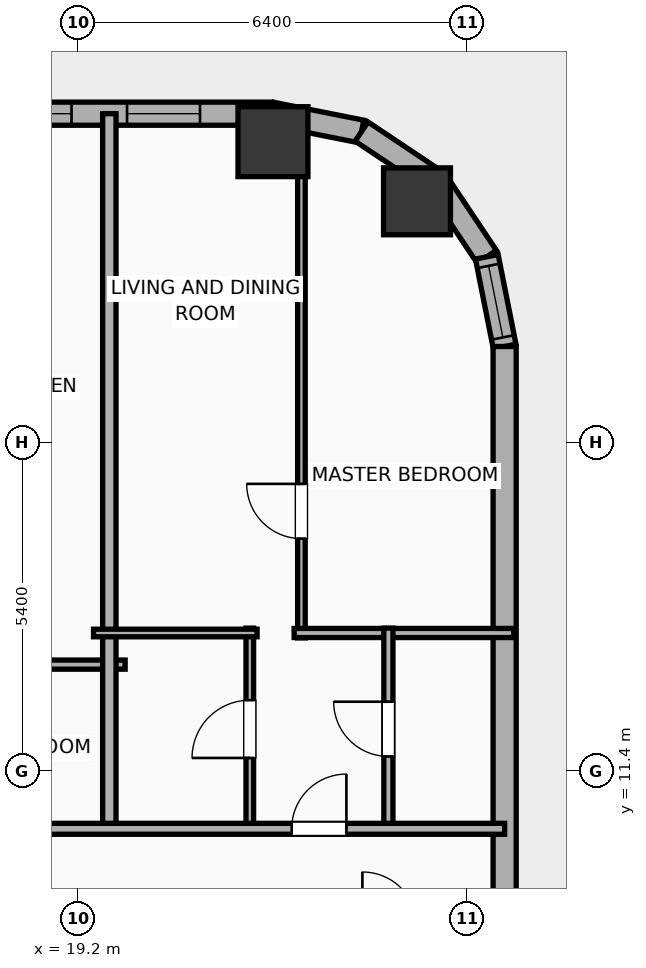
"""IFC4 building model, lengths in metres.
Left out: names, types, materials, properties, quantities, classifications, styles, units other than length and angle.
Written with IfcOpenShell. Run it as: python <this file> out.ifc"""

import sys

from ifc_helpers import new_model, si_unit, direction, frame, frame_2d, origin, origin_2d, place, context, subcontext, project, spatial, rectangle, hollow_rectangle, hollow_circle, extrude, element, fill, save


model = new_model("IFC4")
c1 = context("Model", 3, precision=1e-05, world=origin(), true_north=direction((0.0, 1.0)))
c2 = subcontext(c1, "Body", "Model", "MODEL_VIEW")
j1 = project(units=[si_unit("LENGTHUNIT", "METRE"), si_unit("PLANEANGLEUNIT", "RADIAN")], contexts=[c1])
p1 = place(None, origin())
s1 = spatial("IfcSite", under=j1, at=p1, CompositionType="ELEMENT")
p2 = place(p1, origin())
s2 = spatial("IfcBuilding", under=s1, at=p2, CompositionType="ELEMENT")
p3 = place(p2, frame((0.0, 0.0, 26.0)))
s3 = spatial("IfcBuildingStorey", under=s2, at=p3, CompositionType="ELEMENT", Elevation=26.0)
p4 = place(p3, frame((24.769, 20.769, -0.25), z_axis=(0.0, 0.0, 1.0), x_axis=(1.0, 0.0, 0.0)))
e1 = element("IfcColumn", 1, at=p4, inside=s3, PredefinedType="COLUMN", context=c2, shape_type="SweptSolid", body=[
    extrude(hollow_circle(Radius=0.55, WallThickness=0.036, at=origin_2d()), origin(), (0.0, 0.0, 1.0), 4.15),
])
p5 = place(p3, frame((22.4, 21.75, -0.25), z_axis=(0.0, 0.0, 1.0), x_axis=(1.0, 0.0, 0.0)))
e2 = element("IfcColumn", 2, at=p5, inside=s3, PredefinedType="COLUMN", context=c2, shape_type="SweptSolid", body=[
    extrude(hollow_rectangle(XDim=1.15, YDim=1.15, WallThickness=0.04, at=origin_2d()), origin(), (0.0, 0.0, 1.0), 4.15),
])
p6 = place(p3, frame((-29.581, 22.21, 0.0), z_axis=(0.0, 0.0, 1.0), x_axis=(1.0, 0.0, 0.0)))
e3 = element("IfcWall", 3, at=p6, inside=s3, PredefinedType="ELEMENTEDWALL", context=c2, shape_type="SweptSolid", body=[
    extrude(rectangle(XDim=51.963, YDim=0.38, at=frame_2d((25.981, 0.0))), origin(), (0.0, 0.0, 1.0), 2.54),
])
p7 = place(p6, frame((6.61, 0.0, 0.75)))
e4 = element("IfcOpeningElement", 4, at=p7, cuts=e3, PredefinedType="OPENING", context=c2, shape_type="SweptSolid", body=[
    extrude(rectangle(XDim=2.4, YDim=1.63, at=frame_2d((1.2, 0.815))), frame((0.0, 0.2, 0.0), z_axis=(0.0, -1.0, 0.0), x_axis=(1.0, 0.0, 0.0)), (0.0, 0.0, 1.0), 0.4),
])
p8 = place(p6, frame((24.781, 0.0, 0.75)))
e5 = element("IfcOpeningElement", 5, at=p8, cuts=e3, PredefinedType="OPENING", context=c2, shape_type="SweptSolid", body=[
    extrude(rectangle(XDim=2.4, YDim=1.63, at=frame_2d((1.2, 0.815))), frame((0.0, 0.2, 0.0), z_axis=(0.0, -1.0, 0.0), x_axis=(1.0, 0.0, 0.0)), (0.0, 0.0, 1.0), 0.4),
])
p9 = place(p6, frame((42.952, 0.0, 0.75)))
e6 = element("IfcOpeningElement", 6, at=p9, cuts=e3, PredefinedType="OPENING", context=c2, shape_type="SweptSolid", body=[
    extrude(rectangle(XDim=2.4, YDim=1.63, at=frame_2d((1.2, 0.815))), frame((0.0, 0.2, 0.0), z_axis=(0.0, -1.0, 0.0), x_axis=(1.0, 0.0, 0.0)), (0.0, 0.0, 1.0), 0.4),
])
p10 = place(p6, frame((3.476, 0.0, 0.75)))
e7 = element("IfcOpeningElement", 7, at=p10, cuts=e3, PredefinedType="OPENING", context=c2, shape_type="SweptSolid", body=[
    extrude(rectangle(XDim=1.2, YDim=1.63, at=frame_2d((0.6, 0.815))), frame((0.0, 0.2, 0.0), z_axis=(0.0, -1.0, 0.0), x_axis=(1.0, 0.0, 0.0)), (0.0, 0.0, 1.0), 0.4),
])
p11 = place(p6, frame((11.236, 0.0, 0.75)))
e8 = element("IfcOpeningElement", 8, at=p11, cuts=e3, PredefinedType="OPENING", context=c2, shape_type="SweptSolid", body=[
    extrude(rectangle(XDim=1.2, YDim=1.63, at=frame_2d((0.6, 0.815))), frame((0.0, 0.2, 0.0), z_axis=(0.0, -1.0, 0.0), x_axis=(1.0, 0.0, 0.0)), (0.0, 0.0, 1.0), 0.4),
])
p12 = place(p6, frame((14.576, 0.0, 0.75)))
e9 = element("IfcOpeningElement", 9, at=p12, cuts=e3, PredefinedType="OPENING", context=c2, shape_type="SweptSolid", body=[
    extrude(rectangle(XDim=1.2, YDim=1.63, at=frame_2d((0.6, 0.815))), frame((0.0, 0.2, 0.0), z_axis=(0.0, -1.0, 0.0), x_axis=(1.0, 0.0, 0.0)), (0.0, 0.0, 1.0), 0.4),
])
p13 = place(p6, frame((18.276, 0.0, 0.75)))
e10 = element("IfcOpeningElement", 10, at=p13, cuts=e3, PredefinedType="OPENING", context=c2, shape_type="SweptSolid", body=[
    extrude(rectangle(XDim=1.2, YDim=1.63, at=frame_2d((0.6, 0.815))), frame((0.0, 0.2, 0.0), z_axis=(0.0, -1.0, 0.0), x_axis=(1.0, 0.0, 0.0)), (0.0, 0.0, 1.0), 0.4),
])
p14 = place(p6, frame((21.976, 0.0, 0.75)))
e11 = element("IfcOpeningElement", 11, at=p14, cuts=e3, PredefinedType="OPENING", context=c2, shape_type="SweptSolid", body=[
    extrude(rectangle(XDim=1.2, YDim=1.63, at=frame_2d((0.6, 0.815))), frame((0.0, 0.2, 0.0), z_axis=(0.0, -1.0, 0.0), x_axis=(1.0, 0.0, 0.0)), (0.0, 0.0, 1.0), 0.4),
])
p15 = place(p6, frame((29.136, 0.0, 0.75)))
e12 = element("IfcOpeningElement", 12, at=p15, cuts=e3, PredefinedType="OPENING", context=c2, shape_type="SweptSolid", body=[
    extrude(rectangle(XDim=1.2, YDim=1.63, at=frame_2d((0.6, 0.815))), frame((0.0, 0.2, 0.0), z_axis=(0.0, -1.0, 0.0), x_axis=(1.0, 0.0, 0.0)), (0.0, 0.0, 1.0), 0.4),
])
p16 = place(p6, frame((33.076, 0.0, 0.75)))
e13 = element("IfcOpeningElement", 13, at=p16, cuts=e3, PredefinedType="OPENING", context=c2, shape_type="SweptSolid", body=[
    extrude(rectangle(XDim=1.2, YDim=1.63, at=frame_2d((0.6, 0.815))), frame((0.0, 0.2, 0.0), z_axis=(0.0, -1.0, 0.0), x_axis=(1.0, 0.0, 0.0)), (0.0, 0.0, 1.0), 0.4),
])
p17 = place(p6, frame((36.776, 0.0, 0.75)))
e14 = element("IfcOpeningElement", 14, at=p17, cuts=e3, PredefinedType="OPENING", context=c2, shape_type="SweptSolid", body=[
    extrude(rectangle(XDim=1.2, YDim=1.63, at=frame_2d((0.6, 0.815))), frame((0.0, 0.2, 0.0), z_axis=(0.0, -1.0, 0.0), x_axis=(1.0, 0.0, 0.0)), (0.0, 0.0, 1.0), 0.4),
])
p18 = place(p6, frame((39.931, 0.0, 0.75)))
e15 = element("IfcOpeningElement", 15, at=p18, cuts=e3, PredefinedType="OPENING", context=c2, shape_type="SweptSolid", body=[
    extrude(rectangle(XDim=0.85, YDim=1.63, at=frame_2d((0.425, 0.815))), frame((0.0, 0.2, 0.0), z_axis=(0.0, -1.0, 0.0), x_axis=(1.0, 0.0, 0.0)), (0.0, 0.0, 1.0), 0.4),
])
p19 = place(p6, frame((47.469, 0.0, 0.75)))
e16 = element("IfcOpeningElement", 16, at=p19, cuts=e3, PredefinedType="OPENING", context=c2, shape_type="SweptSolid", body=[
    extrude(rectangle(XDim=1.2, YDim=1.63, at=frame_2d((0.6, 0.815))), frame((0.0, 0.2, 0.0), z_axis=(0.0, -1.0, 0.0), x_axis=(1.0, 0.0, 0.0)), (0.0, 0.0, 1.0), 0.4),
])
p20 = place(p6, frame((49.581, 0.0, 0.75)))
e17 = element("IfcOpeningElement", 17, at=p20, cuts=e3, PredefinedType="OPENING", context=c2, shape_type="SweptSolid", body=[
    extrude(rectangle(XDim=1.2, YDim=1.63, at=frame_2d((0.6, 0.815))), frame((0.0, 0.2, 0.0), z_axis=(0.0, -1.0, 0.0), x_axis=(1.0, 0.0, 0.0)), (0.0, 0.0, 1.0), 0.4),
])
p21 = place(p3, frame((22.381, 22.21, 0.0), z_axis=(0.0, 0.0, 1.0), x_axis=(0.980786132421, -0.195086038585, 0.0)))
e18 = element("IfcWall", 18, at=p21, inside=s3, PredefinedType="ELEMENTEDWALL", context=c2, shape_type="SweptSolid", body=[
    extrude(rectangle(XDim=1.504, YDim=0.38, at=frame_2d((0.752, 0.0))), origin(), (0.0, 0.0, 1.0), 2.54),
])
p22 = place(p3, frame((23.857, 21.917, 0.0), z_axis=(0.0, 0.0, 1.0), x_axis=(0.831392092774, -0.555686231674, 0.0)))
e19 = element("IfcWall", 19, at=p22, inside=s3, PredefinedType="ELEMENTEDWALL", context=c2, shape_type="SweptSolid", body=[
    extrude(rectangle(XDim=1.485, YDim=0.38, at=frame_2d((0.743, 0.0))), origin(), (0.0, 0.0, 1.0), 2.54),
])
p23 = place(p3, frame((25.091, 21.091, 0.0), z_axis=(0.0, 0.0, 1.0), x_axis=(0.555686231674, -0.831392092774, 0.0)))
e20 = element("IfcWall", 20, at=p23, inside=s3, PredefinedType="ELEMENTEDWALL", context=c2, shape_type="SweptSolid", body=[
    extrude(rectangle(XDim=1.485, YDim=0.38, at=frame_2d((0.743, 0.0))), origin(), (0.0, 0.0, 1.0), 3.65),
])
p24 = place(p3, frame((25.917, 19.857, 0.0), z_axis=(0.0, 0.0, 1.0), x_axis=(0.195086038585, -0.980786132421, 0.0)))
e21 = element("IfcWall", 21, at=p24, inside=s3, PredefinedType="ELEMENTEDWALL", context=c2, shape_type="SweptSolid", body=[
    extrude(rectangle(XDim=1.504, YDim=0.38, at=frame_2d((0.752, 0.0))), origin(), (0.0, 0.0, 1.0), 3.65),
])
p25 = place(p24, frame((0.152, 0.0, 0.75)))
e22 = element("IfcOpeningElement", 22, at=p25, cuts=e21, PredefinedType="OPENING", context=c2, shape_type="SweptSolid", body=[
    extrude(rectangle(XDim=1.2, YDim=2.05, at=frame_2d((0.6, 1.025))), frame((0.0, 0.2, 0.0), z_axis=(0.0, -1.0, 0.0), x_axis=(1.0, 0.0, 0.0)), (0.0, 0.0, 1.0), 0.4),
])
p26 = place(p3, frame((26.21, 18.381, 0.0), z_axis=(0.0, 0.0, 1.0), x_axis=(0.0, -1.0, 0.0)))
e23 = element("IfcWall", 23, at=p26, inside=s3, PredefinedType="ELEMENTEDWALL", context=c2, shape_type="SweptSolid", body=[
    extrude(rectangle(XDim=36.763, YDim=0.38, at=frame_2d((18.381, 0.0))), origin(), (0.0, 0.0, 1.0), 2.54),
])
p27 = place(p26, frame((33.362, 0.0, 0.75)))
e24 = element("IfcOpeningElement", 24, at=p27, cuts=e23, PredefinedType="OPENING", context=c2, shape_type="SweptSolid", body=[
    extrude(rectangle(XDim=1.2, YDim=1.63, at=frame_2d((0.6, 0.815))), frame((0.0, 0.2, 0.0), z_axis=(0.0, -1.0, 0.0), x_axis=(1.0, 0.0, 0.0)), (0.0, 0.0, 1.0), 0.4),
])
p28 = place(p3, frame((17.186, 13.15, 0.0), z_axis=(0.0, 0.0, 1.0), x_axis=(1.0, 0.0, 0.0)))
e25 = element("IfcWall", 25, at=p28, inside=s3, PredefinedType="PLUMBINGWALL", context=c2, shape_type="SweptSolid", body=[
    extrude(rectangle(XDim=2.783, YDim=0.15, at=frame_2d((1.392, 0.0))), origin(), (0.0, 0.0, 1.0), 3.65),
])
p29 = place(p3, frame((19.709, 10.37, 0.0), z_axis=(0.0, 0.0, 1.0), x_axis=(0.0, 1.0, 0.0)))
e26 = element("IfcWall", 26, at=p29, inside=s3, PredefinedType="PARTITIONING", context=c2, shape_type="SweptSolid", body=[
    extrude(rectangle(XDim=11.84, YDim=0.22, at=frame_2d((5.92, 0.0))), origin(), (0.0, 0.0, 1.0), 3.65),
])
p30 = place(p3, frame((22.868, 13.59, 0.0), z_axis=(0.0, 0.0, 1.0), x_axis=(0.0, 1.0, 0.0)))
e27 = element("IfcWall", 27, at=p30, inside=s3, PredefinedType="PARTITIONING", context=c2, shape_type="SweptSolid", body=[
    extrude(rectangle(XDim=8.676, YDim=0.125, at=frame_2d((4.338, 0.0))), origin(), (0.0, 0.0, 1.0), 2.54),
])
p31 = place(p30, frame((1.632, 0.0, 0.0)))
e28 = element("IfcOpeningElement", 28, at=p31, cuts=e27, PredefinedType="OPENING", context=c2, shape_type="SweptSolid", body=[
    extrude(rectangle(XDim=0.9, YDim=2.05, at=frame_2d((0.45, 1.025))), frame((0.0, 0.073, 0.0), z_axis=(0.0, -1.0, 0.0), x_axis=(1.0, 0.0, 0.0)), (0.0, 0.0, 1.0), 0.145),
])
p32 = place(p3, frame((22.748, 13.67, 0.0), z_axis=(0.0, 0.0, 1.0), x_axis=(1.0, 0.0, 0.0)))
e29 = element("IfcWall", 29, at=p32, inside=s3, PredefinedType="PLUMBINGWALL", context=c2, shape_type="SweptSolid", body=[
    extrude(rectangle(XDim=3.612, YDim=0.15, at=frame_2d((1.806, 0.0))), origin(), (0.0, 0.0, 1.0), 3.65),
])
p33 = place(p3, frame((22.019, 10.43, 0.0), z_axis=(0.0, 0.0, 1.0), x_axis=(0.0, 1.0, 0.0)))
e30 = element("IfcWall", 30, at=p33, inside=s3, PredefinedType="PARTITIONING", context=c2, shape_type="SweptSolid", body=[
    extrude(rectangle(XDim=3.32, YDim=0.125, at=frame_2d((1.66, 0.0))), origin(), (0.0, 0.0, 1.0), 2.54),
])
p34 = place(p33, frame((1.185, 0.0, 0.0)))
e31 = element("IfcOpeningElement", 31, at=p34, cuts=e30, PredefinedType="OPENING", context=c2, shape_type="SweptSolid", body=[
    extrude(rectangle(XDim=0.95, YDim=2.05, at=frame_2d((0.475, 1.025))), frame((0.0, 0.073, 0.0), z_axis=(0.0, -1.0, 0.0), x_axis=(1.0, 0.0, 0.0)), (0.0, 0.0, 1.0), 0.145),
])
p35 = place(p3, frame((19.449, 13.67, 0.0), z_axis=(0.0, 0.0, 1.0), x_axis=(1.0, 0.0, 0.0)))
e32 = element("IfcWall", 32, at=p35, inside=s3, PredefinedType="PARTITIONING", context=c2, shape_type="SweptSolid", body=[
    extrude(rectangle(XDim=2.69, YDim=0.125, at=frame_2d((1.345, 0.0))), origin(), (0.0, 0.0, 1.0), 3.65),
])
p36 = place(p3, frame((24.298, 10.43, 0.0), z_axis=(0.0, 0.0, 1.0), x_axis=(0.0, 1.0, 0.0)))
e33 = element("IfcWall", 33, at=p36, inside=s3, PredefinedType="PLUMBINGWALL", context=c2, shape_type="SweptSolid", body=[
    extrude(rectangle(XDim=3.32, YDim=0.15, at=frame_2d((1.66, 0.0))), origin(), (0.0, 0.0, 1.0), 3.65),
])
p37 = place(p36, frame((1.21, 0.0, 0.0)))
e34 = element("IfcOpeningElement", 34, at=p37, cuts=e33, PredefinedType="OPENING", context=c2, shape_type="SweptSolid", body=[
    extrude(rectangle(XDim=0.9, YDim=2.05, at=frame_2d((0.45, 1.025))), frame((0.0, 0.085, 0.0), z_axis=(0.0, -1.0, 0.0), x_axis=(1.0, 0.0, 0.0)), (0.0, 0.0, 1.0), 0.17),
])
p38 = place(p3, frame((-33.41, 10.45, 0.0), z_axis=(0.0, 0.0, 1.0), x_axis=(1.0, 0.0, 0.0)))
e35 = element("IfcWall", 35, at=p38, inside=s3, PredefinedType="PARTITIONING", context=c2, shape_type="SweptSolid", body=[
    extrude(rectangle(XDim=59.62, YDim=0.18, at=frame_2d((29.81, 0.0))), origin(), (0.0, 0.0, 1.0), 3.65),
])
p39 = place(p38, frame((4.529, 0.0, 0.0)))
e36 = element("IfcOpeningElement", 36, at=p39, cuts=e35, PredefinedType="OPENING", context=c2, shape_type="SweptSolid", body=[
    extrude(rectangle(XDim=1.15, YDim=2.05, at=frame_2d((0.575, 1.025))), frame((0.0, 0.1, 0.0), z_axis=(0.0, -1.0, 0.0), x_axis=(1.0, 0.0, 0.0)), (0.0, 0.0, 1.0), 0.2),
])
p40 = place(p38, frame((12.899, 0.0, 0.0)))
e37 = element("IfcOpeningElement", 37, at=p40, cuts=e35, PredefinedType="OPENING", context=c2, shape_type="SweptSolid", body=[
    extrude(rectangle(XDim=1.15, YDim=2.05, at=frame_2d((0.575, 1.025))), frame((0.0, 0.1, 0.0), z_axis=(0.0, -1.0, 0.0), x_axis=(1.0, 0.0, 0.0)), (0.0, 0.0, 1.0), 0.2),
])
p41 = place(p38, frame((20.298, 0.0, 0.0)))
e38 = element("IfcOpeningElement", 38, at=p41, cuts=e35, PredefinedType="OPENING", context=c2, shape_type="SweptSolid", body=[
    extrude(rectangle(XDim=1.15, YDim=2.05, at=frame_2d((0.575, 1.025))), frame((0.0, 0.1, 0.0), z_axis=(0.0, -1.0, 0.0), x_axis=(1.0, 0.0, 0.0)), (0.0, 0.0, 1.0), 0.2),
])
p42 = place(p38, frame((27.703, 0.0, 0.0)))
e39 = element("IfcOpeningElement", 39, at=p42, cuts=e35, PredefinedType="OPENING", context=c2, shape_type="SweptSolid", body=[
    extrude(rectangle(XDim=1.15, YDim=2.05, at=frame_2d((0.575, 1.025))), frame((0.0, 0.1, 0.0), z_axis=(0.0, -1.0, 0.0), x_axis=(1.0, 0.0, 0.0)), (0.0, 0.0, 1.0), 0.2),
])
p43 = place(p38, frame((35.102, 0.0, 0.0)))
e40 = element("IfcOpeningElement", 40, at=p43, cuts=e35, PredefinedType="OPENING", context=c2, shape_type="SweptSolid", body=[
    extrude(rectangle(XDim=1.15, YDim=2.05, at=frame_2d((0.575, 1.025))), frame((0.0, 0.1, 0.0), z_axis=(0.0, -1.0, 0.0), x_axis=(1.0, 0.0, 0.0)), (0.0, 0.0, 1.0), 0.2),
])
p44 = place(p38, frame((42.5, 0.0, 0.0)))
e41 = element("IfcOpeningElement", 41, at=p44, cuts=e35, PredefinedType="OPENING", context=c2, shape_type="SweptSolid", body=[
    extrude(rectangle(XDim=1.15, YDim=2.05, at=frame_2d((0.575, 1.025))), frame((0.0, 0.1, 0.0), z_axis=(0.0, -1.0, 0.0), x_axis=(1.0, 0.0, 0.0)), (0.0, 0.0, 1.0), 0.2),
])
p45 = place(p38, frame((48.099, 0.0, 0.0)))
e42 = element("IfcOpeningElement", 42, at=p45, cuts=e35, PredefinedType="OPENING", context=c2, shape_type="SweptSolid", body=[
    extrude(rectangle(XDim=1.15, YDim=2.05, at=frame_2d((0.575, 1.025))), frame((0.0, 0.1, 0.0), z_axis=(0.0, -1.0, 0.0), x_axis=(1.0, 0.0, 0.0)), (0.0, 0.0, 1.0), 0.2),
])
p46 = place(p38, frame((56.117, 0.0, 0.0)))
e43 = element("IfcOpeningElement", 43, at=p46, cuts=e35, PredefinedType="OPENING", context=c2, shape_type="SweptSolid", body=[
    extrude(rectangle(XDim=0.9, YDim=2.05, at=frame_2d((0.45, 1.025))), frame((0.0, 0.1, 0.0), z_axis=(0.0, -1.0, 0.0), x_axis=(1.0, 0.0, 0.0)), (0.0, 0.0, 1.0), 0.2),
])
p47 = place(p19, origin())
e44 = element("IfcWindow", 44, at=p47, inside=s3, PartitioningType="SINGLE_PANEL", PredefinedType="WINDOW", context=c2, shape_type="SweptSolid", body=[
    extrude(rectangle(XDim=1.2, YDim=1.63, at=frame_2d((0.6, 0.815))), frame((0.0, 0.03, 0.0), z_axis=(0.0, -1.0, 0.0), x_axis=(1.0, 0.0, 0.0)), (0.0, 0.0, 1.0), 0.06),
])
fill(e16, e44)
p48 = place(p20, origin())
e45 = element("IfcWindow", 45, at=p48, inside=s3, PartitioningType="SINGLE_PANEL", PredefinedType="WINDOW", context=c2, shape_type="SweptSolid", body=[
    extrude(rectangle(XDim=1.2, YDim=1.63, at=frame_2d((0.6, 0.815))), frame((0.0, 0.03, 0.0), z_axis=(0.0, -1.0, 0.0), x_axis=(1.0, 0.0, 0.0)), (0.0, 0.0, 1.0), 0.06),
])
fill(e17, e45)
p49 = place(p25, origin())
e46 = element("IfcWindow", 46, at=p49, inside=s3, PartitioningType="SINGLE_PANEL", PredefinedType="WINDOW", context=c2, shape_type="SweptSolid", body=[
    extrude(rectangle(XDim=1.2, YDim=2.05, at=frame_2d((0.6, 1.025))), frame((0.0, 0.03, 0.0), z_axis=(0.0, -1.0, 0.0), x_axis=(1.0, 0.0, 0.0)), (0.0, 0.0, 1.0), 0.06),
])
fill(e22, e46)
p50 = place(p31, origin())
e47 = element("IfcDoor", 47, at=p50, inside=s3, OperationType="SINGLE_SWING_RIGHT", PredefinedType="DOOR", context=c2, shape_type="SweptSolid", body=[
    extrude(rectangle(XDim=0.9, YDim=2.05, at=frame_2d((0.45, 1.025))), frame((0.0, 0.025, 0.0), z_axis=(0.0, -1.0, 0.0), x_axis=(1.0, 0.0, 0.0)), (0.0, 0.0, 1.0), 0.05),
])
fill(e28, e47)
p51 = place(p34, origin())
e48 = element("IfcDoor", 48, at=p51, inside=s3, OperationType="SINGLE_SWING_LEFT", PredefinedType="DOOR", context=c2, shape_type="SweptSolid", body=[
    extrude(rectangle(XDim=0.95, YDim=2.05, at=frame_2d((0.475, 1.025))), frame((0.0, 0.025, 0.0), z_axis=(0.0, -1.0, 0.0), x_axis=(1.0, 0.0, 0.0)), (0.0, 0.0, 1.0), 0.05),
])
fill(e31, e48)
p52 = place(p37, origin())
e49 = element("IfcDoor", 49, at=p52, inside=s3, OperationType="SINGLE_SWING_RIGHT", PredefinedType="DOOR", context=c2, shape_type="SweptSolid", body=[
    extrude(rectangle(XDim=0.9, YDim=2.05, at=frame_2d((0.45, 1.025))), frame((0.0, 0.025, 0.0), z_axis=(0.0, -1.0, 0.0), x_axis=(1.0, 0.0, 0.0)), (0.0, 0.0, 1.0), 0.05),
])
fill(e34, e49)
p53 = place(p46, origin())
e50 = element("IfcDoor", 50, at=p53, inside=s3, OperationType="SINGLE_SWING_RIGHT", PredefinedType="DOOR", context=c2, shape_type="SweptSolid", body=[
    extrude(rectangle(XDim=0.9, YDim=2.05, at=frame_2d((0.45, 1.025))), frame((0.0, 0.025, 0.0), z_axis=(0.0, -1.0, 0.0), x_axis=(1.0, 0.0, 0.0)), (0.0, 0.0, 1.0), 0.05),
])
fill(e43, e50)
save(model, sys.argv[1])
